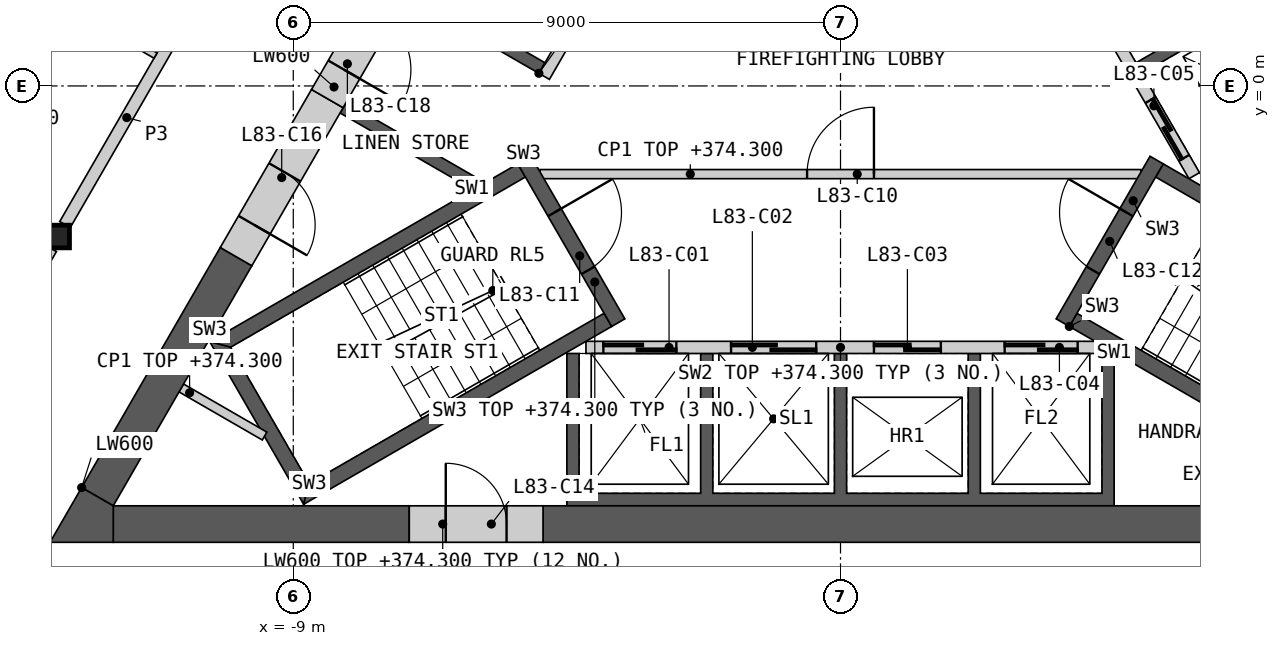
"""IFC4 building model, lengths in metres.
Left out: names, types, materials, properties, quantities, classifications, styles, units other than length and angle.
Written with IfcOpenShell. Run it as: python <this file> out.ifc"""

import sys

from ifc_helpers import new_model, si_unit, direction, frame, frame_2d, origin, origin_2d, place, context, subcontext, project, spatial, polyline, rectangle, i_section, outline, extrude, element, fill, save


model = new_model("IFC4")
c1 = context("Model", 3, precision=1e-05, world=origin(), true_north=direction((0.0, 1.0)))
c2 = subcontext(c1, "Body", "Model", "MODEL_VIEW")
j1 = project(units=[si_unit("LENGTHUNIT", "METRE"), si_unit("PLANEANGLEUNIT", "RADIAN")], contexts=[c1])
p1 = place(None, origin())
s1 = spatial("IfcSite", under=j1, at=p1, CompositionType="ELEMENT")
p2 = place(p1, origin())
s2 = spatial("IfcBuilding", under=s1, at=p2, CompositionType="ELEMENT")
p3 = place(p2, frame((0.0, 0.0, 371.2)))
s3 = spatial("IfcBuildingStorey", under=s2, at=p3, CompositionType="ELEMENT", Elevation=371.2)
p4 = place(p3, frame((-12.868, -2.476, 0.0), z_axis=(0.0, 0.0, 1.0), x_axis=(1.0, 0.0, 0.0)))
e1 = element("IfcColumn", 1, at=p4, inside=s3, PredefinedType="COLUMN", context=c2, shape_type="SweptSolid", body=[
    extrude(i_section(OverallWidth=0.374, OverallDepth=0.372, WebThickness=0.016, FlangeThickness=0.026, at=origin_2d()), origin(), (0.0, 0.0, 1.0), 3.4),
])
p5 = place(p3, origin())
e2 = element("IfcWall", 2, at=p5, inside=s3, PredefinedType="SHEAR", context=c2, shape_type="SweptSolid", body=[
    extrude(outline(polyline([(4.5, -4.4), (4.5, -6.906), (-4.5, -6.906), (-4.5, -4.4), (-4.3, -4.4), (-4.3, -6.7), (-2.3, -6.7), (-2.3, -4.4), (-2.1, -4.4), (-2.1, -6.7), (-0.1, -6.7), (-0.1, -4.4), (0.1, -4.4), (0.1, -6.7), (2.1, -6.7), (2.1, -4.4), (2.3, -4.4), (2.3, -6.7), (4.3, -6.7), (4.3, -4.4), (4.5, -4.4)])), origin(), (0.0, 0.0, 1.0), 3.1),
])
p6 = place(p3, frame((-4.187, -4.3, 0.0), z_axis=(0.0, 0.0, 1.0), x_axis=(1.0, 0.0, 0.0)))
e3 = element("IfcWall", 3, at=p6, inside=s3, PredefinedType="SOLIDWALL", context=c2, shape_type="SweptSolid", body=[
    extrude(rectangle(XDim=8.373, YDim=0.2, at=frame_2d((4.187, 0.0))), origin(), (0.0, 0.0, 1.0), 3.1),
])
p7 = place(p6, frame((0.287, 0.0, 0.0)))
e4 = element("IfcOpeningElement", 4, at=p7, cuts=e3, PredefinedType="OPENING", context=c2, shape_type="SweptSolid", body=[
    extrude(rectangle(XDim=1.2, YDim=2.1, at=frame_2d((0.6, 1.05))), frame((0.0, 0.11, 0.0), z_axis=(0.0, -1.0, 0.0), x_axis=(1.0, 0.0, 0.0)), (0.0, 0.0, 1.0), 0.22),
])
p8 = place(p6, frame((2.387, 0.0, 0.0)))
e5 = element("IfcOpeningElement", 5, at=p8, cuts=e3, PredefinedType="OPENING", context=c2, shape_type="SweptSolid", body=[
    extrude(rectangle(XDim=1.4, YDim=2.1, at=frame_2d((0.7, 1.05))), frame((0.0, 0.11, 0.0), z_axis=(0.0, -1.0, 0.0), x_axis=(1.0, 0.0, 0.0)), (0.0, 0.0, 1.0), 0.22),
])
p9 = place(p6, frame((4.737, 0.0, 0.0)))
e6 = element("IfcOpeningElement", 6, at=p9, cuts=e3, PredefinedType="OPENING", context=c2, shape_type="SweptSolid", body=[
    extrude(rectangle(XDim=1.1, YDim=2.1, at=frame_2d((0.55, 1.05))), frame((0.0, 0.11, 0.0), z_axis=(0.0, -1.0, 0.0), x_axis=(1.0, 0.0, 0.0)), (0.0, 0.0, 1.0), 0.22),
])
p10 = place(p6, frame((6.887, 0.0, 0.0)))
e7 = element("IfcOpeningElement", 7, at=p10, cuts=e3, PredefinedType="OPENING", context=c2, shape_type="SweptSolid", body=[
    extrude(rectangle(XDim=1.2, YDim=2.1, at=frame_2d((0.6, 1.05))), frame((0.0, 0.11, 0.0), z_axis=(0.0, -1.0, 0.0), x_axis=(1.0, 0.0, 0.0)), (0.0, 0.0, 1.0), 0.22),
])
p11 = place(p3, origin())
e8 = element("IfcWall", 8, at=p11, inside=s3, PredefinedType="SHEAR", context=c2, shape_type="SweptSolid", body=[
    extrude(outline(polyline([(1.561, 6.097), (3.731, 7.35), (8.231, -0.444), (6.061, -1.697), (5.96, -1.524), (7.952, -0.374), (6.952, 1.358), (4.96, 0.208), (4.861, 0.381), (6.852, 1.531), (5.852, 3.263), (3.861, 2.113), (3.76, 2.287), (5.752, 3.437), (4.752, 5.169), (2.76, 4.019), (2.66, 4.192), (4.652, 5.342), (3.652, 7.074), (1.66, 5.924), (1.561, 6.097)])), origin(), (0.0, 0.0, 1.0), 3.1),
])
p12 = place(p3, frame((5.817, -1.476, 0.0), z_axis=(0.0, 0.0, 1.0), x_axis=(-0.500002616675, 0.866023893041, 0.0)))
e9 = element("IfcWall", 9, at=p12, inside=s3, PredefinedType="SOLIDWALL", context=c2, shape_type="SweptSolid", body=[
    extrude(rectangle(XDim=8.373, YDim=0.2, at=frame_2d((4.187, 0.0))), origin(), (0.0, 0.0, 1.0), 3.1),
])
p13 = place(p12, frame((0.337, 0.0, 0.0)))
e10 = element("IfcOpeningElement", 10, at=p13, cuts=e9, PredefinedType="OPENING", context=c2, shape_type="SweptSolid", body=[
    extrude(rectangle(XDim=1.1, YDim=2.1, at=frame_2d((0.55, 1.05))), frame((0.0, 0.11, 0.0), z_axis=(0.0, -1.0, 0.0), x_axis=(1.0, 0.0, 0.0)), (0.0, 0.0, 1.0), 0.22),
])
p14 = place(p12, frame((2.537, 0.0, 0.0)))
e11 = element("IfcOpeningElement", 11, at=p14, cuts=e9, PredefinedType="OPENING", context=c2, shape_type="SweptSolid", body=[
    extrude(rectangle(XDim=1.1, YDim=2.1, at=frame_2d((0.55, 1.05))), frame((0.0, 0.11, 0.0), z_axis=(0.0, -1.0, 0.0), x_axis=(1.0, 0.0, 0.0)), (0.0, 0.0, 1.0), 0.22),
])
p15 = place(p12, frame((4.737, 0.0, 0.0)))
e12 = element("IfcOpeningElement", 12, at=p15, cuts=e9, PredefinedType="OPENING", context=c2, shape_type="SweptSolid", body=[
    extrude(rectangle(XDim=1.1, YDim=2.1, at=frame_2d((0.55, 1.05))), frame((0.0, 0.11, 0.0), z_axis=(0.0, -1.0, 0.0), x_axis=(1.0, 0.0, 0.0)), (0.0, 0.0, 1.0), 0.22),
])
p16 = place(p12, frame((7.037, 0.0, 0.0)))
e13 = element("IfcOpeningElement", 13, at=p16, cuts=e9, PredefinedType="OPENING", context=c2, shape_type="SweptSolid", body=[
    extrude(rectangle(XDim=0.9, YDim=2.1, at=frame_2d((0.45, 1.05))), frame((0.0, 0.11, 0.0), z_axis=(0.0, -1.0, 0.0), x_axis=(1.0, 0.0, 0.0)), (0.0, 0.0, 1.0), 0.22),
])
p17 = place(p3, origin())
e14 = element("IfcWall", 14, at=p17, inside=s3, PredefinedType="SHEAR", context=c2, shape_type="SweptSolid", body=[
    extrude(outline(polyline([(-6.061, -1.697), (-8.231, -0.444), (-8.131, -0.271), (-5.96, -1.524), (-6.061, -1.697)])), origin(), (0.0, 0.0, 1.0), 3.1),
])
p18 = place(p3, origin())
e15 = element("IfcWall", 15, at=p18, inside=s3, PredefinedType="SHEAR", context=c2, shape_type="SweptSolid", body=[
    extrude(outline(polyline([(-4.96, 0.208), (-7.131, 1.461), (-3.731, 7.35), (-1.561, 6.097), (-1.66, 5.924), (-3.652, 7.074), (-6.852, 1.531), (-4.861, 0.381), (-4.96, 0.208)])), origin(), (0.0, 0.0, 1.0), 3.1),
])
p19 = place(p3, frame((-1.631, 5.776, 0.0), z_axis=(0.0, 0.0, 1.0), x_axis=(-0.499992876559, -0.866029516466, 0.0)))
e16 = element("IfcWall", 16, at=p19, inside=s3, PredefinedType="SOLIDWALL", context=c2, shape_type="SweptSolid", body=[
    extrude(rectangle(XDim=6.486, YDim=0.2, at=frame_2d((3.243, 0.0))), origin(), (0.0, 0.0, 1.0), 3.1),
])
p20 = place(p19, frame((2.637, 0.0, 0.0)))
e17 = element("IfcOpeningElement", 17, at=p20, cuts=e16, PredefinedType="OPENING", context=c2, shape_type="SweptSolid", body=[
    extrude(rectangle(XDim=0.9, YDim=2.1, at=frame_2d((0.45, 1.05))), frame((0.0, 0.11, 0.0), z_axis=(0.0, -1.0, 0.0), x_axis=(1.0, 0.0, 0.0)), (0.0, 0.0, 1.0), 0.22),
])
p21 = place(p3, frame((-4.941, -1.45, 0.0), z_axis=(0.0, 0.0, 1.0), x_axis=(1.0, 0.0, 0.0)))
e18 = element("IfcWall", 18, at=p21, inside=s3, PredefinedType="PARTITIONING", context=c2, shape_type="SweptSolid", body=[
    extrude(rectangle(XDim=9.882, YDim=0.15, at=frame_2d((4.941, 0.0))), origin(), (0.0, 0.0, 1.0), 3.1),
])
p22 = place(p21, frame((4.391, 0.0, 0.0)))
e19 = element("IfcOpeningElement", 19, at=p22, cuts=e18, PredefinedType="OPENING", context=c2, shape_type="SweptSolid", body=[
    extrude(rectangle(XDim=1.1, YDim=2.1, at=frame_2d((0.55, 1.05))), frame((0.0, 0.085, 0.0), z_axis=(0.0, -1.0, 0.0), x_axis=(1.0, 0.0, 0.0)), (0.0, 0.0, 1.0), 0.17),
])
p23 = place(p3, origin())
e20 = element("IfcWall", 20, at=p23, inside=s3, PredefinedType="SHEAR", context=c2, shape_type="SweptSolid", body=[
    extrude(outline(polyline([(-5.307, -1.281), (-10.374, -4.206), (-10.032, -4.298), (-5.182, -1.498), (-5.307, -1.281)])), origin(), (0.0, 0.0, 1.0), 3.1),
])
p24 = place(p3, origin())
e21 = element("IfcWall", 21, at=p24, inside=s3, PredefinedType="SHEAR", context=c2, shape_type="SweptSolid", body=[
    extrude(outline(polyline([(-10.374, -4.206), (-8.83, -6.881), (-8.738, -6.539), (-10.032, -4.298), (-10.374, -4.206)])), origin(), (0.0, 0.0, 1.0), 3.1),
])
p25 = place(p3, origin())
e22 = element("IfcWall", 22, at=p25, inside=s3, PredefinedType="SHEAR", context=c2, shape_type="SweptSolid", body=[
    extrude(outline(polyline([(-8.738, -6.539), (-8.83, -6.881), (-3.763, -3.956), (-3.888, -3.739), (-8.738, -6.539)])), origin(), (0.0, 0.0, 1.0), 3.1),
])
p26 = place(p3, frame((-5.199, -1.219, 0.0), z_axis=(0.0, 0.0, 1.0), x_axis=(0.499982516597, -0.866035497597, 0.0)))
e23 = element("IfcWall", 23, at=p26, inside=s3, PredefinedType="SHEAR", context=c2, shape_type="SweptSolid", body=[
    extrude(rectangle(XDim=3.088, YDim=0.25, at=frame_2d((1.544, 0.0))), origin(), (0.0, 0.0, 1.0), 3.1),
])
p27 = place(p26, frame((0.994, 0.0, 0.0)))
e24 = element("IfcOpeningElement", 24, at=p27, cuts=e23, PredefinedType="OPENING", context=c2, shape_type="SweptSolid", body=[
    extrude(rectangle(XDim=1.1, YDim=2.1, at=frame_2d((0.55, 1.05))), frame((0.0, 0.135, 0.0), z_axis=(0.0, -1.0, 0.0), x_axis=(1.0, 0.0, 0.0)), (0.0, 0.0, 1.0), 0.27),
])
p28 = place(p3, origin())
e25 = element("IfcWall", 25, at=p28, inside=s3, PredefinedType="SHEAR", context=c2, shape_type="SweptSolid", body=[
    extrude(outline(polyline([(3.763, -3.956), (8.83, -6.881), (8.738, -6.539), (3.888, -3.739), (3.763, -3.956)])), origin(), (0.0, 0.0, 1.0), 3.1),
])
p29 = place(p3, origin())
e26 = element("IfcWall", 26, at=p29, inside=s3, PredefinedType="SHEAR", context=c2, shape_type="SweptSolid", body=[
    extrude(outline(polyline([(10.032, -4.298), (10.374, -4.206), (5.307, -1.281), (5.182, -1.498), (10.032, -4.298)])), origin(), (0.0, 0.0, 1.0), 3.1),
])
p30 = place(p3, frame((3.655, -3.893, 0.0), z_axis=(0.0, 0.0, 1.0), x_axis=(0.499982516597, 0.866035497597, 0.0)))
e27 = element("IfcWall", 27, at=p30, inside=s3, PredefinedType="SHEAR", context=c2, shape_type="SweptSolid", body=[
    extrude(rectangle(XDim=3.088, YDim=0.25, at=frame_2d((1.544, 0.0))), origin(), (0.0, 0.0, 1.0), 3.1),
])
p31 = place(p30, frame((0.994, 0.0, 0.0)))
e28 = element("IfcOpeningElement", 28, at=p31, cuts=e27, PredefinedType="OPENING", context=c2, shape_type="SweptSolid", body=[
    extrude(rectangle(XDim=1.1, YDim=2.1, at=frame_2d((0.55, 1.05))), frame((0.0, 0.135, 0.0), z_axis=(0.0, -1.0, 0.0), x_axis=(1.0, 0.0, 0.0)), (0.0, 0.0, 1.0), 0.27),
])
p32 = place(p3, frame((-10.842, -4.967, 0.0), z_axis=(0.0, 0.0, 1.0), x_axis=(0.866098216386, -0.499873863663, 0.0)))
e29 = element("IfcWall", 29, at=p32, inside=s3, PredefinedType="PARTITIONING", context=c2, shape_type="SweptSolid", body=[
    extrude(rectangle(XDim=1.582, YDim=0.15, at=frame_2d((0.791, 0.0))), origin(), (0.0, 0.0, 1.0), 3.1),
])
p33 = place(p3, frame((-4.892, -7.206, 0.0), z_axis=(0.0, 0.0, 1.0), x_axis=(1.0, 0.0, 0.0)))
e30 = element("IfcWall", 30, at=p33, inside=s3, PredefinedType="SHEAR", context=c2, shape_type="SweptSolid", body=[
    extrude(rectangle(XDim=16.853, YDim=0.6, at=frame_2d((8.426, 0.0))), origin(), (0.0, 0.0, 1.0), 3.1),
])
p34 = place(p3, frame((-11.961, -7.206, 0.0), z_axis=(0.0, 0.0, 1.0), x_axis=(1.0, 0.0, 0.0)))
e31 = element("IfcWall", 31, at=p34, inside=s3, PredefinedType="SHEAR", context=c2, shape_type="SweptSolid", body=[
    extrude(rectangle(XDim=4.868, YDim=0.6, at=frame_2d((2.434, 0.0))), origin(), (0.0, 0.0, 1.0), 3.1),
])
p35 = place(p3, frame((8.686, -0.634, 0.0), z_axis=(0.0, 0.0, 1.0), x_axis=(-0.500004601921, 0.866022746848, 0.0)))
e32 = element("IfcWall", 32, at=p35, inside=s3, PredefinedType="SHEAR", context=c2, shape_type="SweptSolid", body=[
    extrude(rectangle(XDim=16.853, YDim=0.6, at=frame_2d((8.426, 0.0))), origin(), (0.0, 0.0, 1.0), 3.1),
])
p36 = place(p3, frame((-9.941, -2.807, 0.0), z_axis=(0.0, 0.0, 1.0), x_axis=(-0.500020646047, -0.866013483456, 0.0)))
e33 = element("IfcWall", 33, at=p36, inside=s3, PredefinedType="SHEAR", context=c2, shape_type="SweptSolid", body=[
    extrude(rectangle(XDim=4.559, YDim=0.6, at=frame_2d((2.28, 0.0))), origin(), (0.0, 0.0, 1.0), 3.1),
])
p37 = place(p3, origin())
e34 = element("IfcWall", 34, at=p37, inside=s3, PredefinedType="SHEAR", context=c2, shape_type="SweptSolid", body=[
    extrude(outline(polyline([(-12.48, -6.606), (-11.961, -6.906), (-11.961, -7.506), (-13.0, -7.506), (-12.48, -6.606)])), origin(), (0.0, 0.0, 1.0), 3.1),
])
p38 = place(p3, frame((-7.092, -7.206, 0.0), z_axis=(0.0, 0.0, 1.0), x_axis=(1.0, 0.0, 0.0)))
e35 = element("IfcWall", 35, at=p38, inside=s3, PredefinedType="SHEAR", context=c2, shape_type="SweptSolid", body=[
    extrude(rectangle(XDim=2.2, YDim=0.6, at=frame_2d((1.1, 0.0))), origin(), (0.0, 0.0, 1.0), 3.1),
])
p39 = place(p38, frame((0.6, 0.0, 0.0)))
e36 = element("IfcOpeningElement", 36, at=p39, cuts=e35, PredefinedType="OPENING", context=c2, shape_type="SweptSolid", body=[
    extrude(rectangle(XDim=1.0, YDim=2.1, at=frame_2d((0.5, 1.05))), frame((0.0, 0.31, 0.0), z_axis=(0.0, -1.0, 0.0), x_axis=(1.0, 0.0, 0.0)), (0.0, 0.0, 1.0), 0.62),
])
p40 = place(p3, frame((-8.44, -0.208, 0.0), z_axis=(0.0, 0.0, 1.0), x_axis=(-0.499997052475, -0.866027105532, 0.0)))
e37 = element("IfcWall", 37, at=p40, inside=s3, PredefinedType="SHEAR", context=c2, shape_type="SweptSolid", body=[
    extrude(rectangle(XDim=3.001, YDim=0.6, at=frame_2d((1.501, 0.0))), origin(), (0.0, 0.0, 1.0), 3.1),
])
p41 = place(p40, frame((1.4, 0.0, 0.0)))
e38 = element("IfcOpeningElement", 38, at=p41, cuts=e37, PredefinedType="OPENING", context=c2, shape_type="SweptSolid", body=[
    extrude(rectangle(XDim=1.0, YDim=2.1, at=frame_2d((0.5, 1.05))), frame((0.0, 0.31, 0.0), z_axis=(0.0, -1.0, 0.0), x_axis=(1.0, 0.0, 0.0)), (0.0, 0.0, 1.0), 0.62),
])
p42 = place(p3, frame((-7.34, 1.698, 0.0), z_axis=(0.0, 0.0, 1.0), x_axis=(-0.50002983664, -0.866008176907, 0.0)))
e39 = element("IfcWall", 39, at=p42, inside=s3, PredefinedType="SHEAR", context=c2, shape_type="SweptSolid", body=[
    extrude(rectangle(XDim=2.2, YDim=0.6, at=frame_2d((1.1, 0.0))), origin(), (0.0, 0.0, 1.0), 3.1),
])
p43 = place(p42, frame((0.55, 0.0, 0.0)))
e40 = element("IfcOpeningElement", 40, at=p43, cuts=e39, PredefinedType="OPENING", context=c2, shape_type="SweptSolid", body=[
    extrude(rectangle(XDim=1.1, YDim=2.1, at=frame_2d((0.55, 1.05))), frame((0.0, 0.31, 0.0), z_axis=(0.0, -1.0, 0.0), x_axis=(1.0, 0.0, 0.0)), (0.0, 0.0, 1.0), 0.62),
])
p44 = place(p3, frame((-12.754, -2.279, 0.0), z_axis=(0.0, 0.0, 1.0), x_axis=(0.500001682468, 0.866024432409, 0.0)))
e41 = element("IfcWall", 41, at=p44, inside=s3, PredefinedType="PARTITIONING", context=c2, shape_type="SweptSolid", body=[
    extrude(rectangle(XDim=8.124, YDim=0.2, at=frame_2d((4.062, 0.0))), origin(), (0.0, 0.0, 1.0), 3.1),
])
p45 = place(p44, frame((3.762, 0.0, 0.0)))
e42 = element("IfcOpeningElement", 42, at=p45, cuts=e41, PredefinedType="OPENING", context=c2, shape_type="SweptSolid", body=[
    extrude(rectangle(XDim=1.0, YDim=2.1, at=frame_2d((0.5, 1.05))), frame((0.0, 0.11, 0.0), z_axis=(0.0, -1.0, 0.0), x_axis=(1.0, 0.0, 0.0)), (0.0, 0.0, 1.0), 0.22),
])
p46 = place(p3, frame((-15.131, -6.397, 0.0), z_axis=(0.0, 0.0, 1.0), x_axis=(0.499986217557, 0.866033360935, 0.0)))
e43 = element("IfcWall", 43, at=p46, inside=s3, PredefinedType="PARTITIONING", context=c2, shape_type="SweptSolid", body=[
    extrude(rectangle(XDim=4.3, YDim=0.2, at=frame_2d((2.15, 0.0))), origin(), (0.0, 0.0, 1.0), 3.1),
])
p47 = place(p3, frame((-17.414, 4.049, 0.0), z_axis=(0.0, 0.0, 1.0), x_axis=(0.866033839264, -0.499985389037, 0.0)))
e44 = element("IfcWall", 44, at=p47, inside=s3, PredefinedType="PARTITIONING", context=c2, shape_type="SweptSolid", body=[
    extrude(rectangle(XDim=7.1, YDim=0.1, at=frame_2d((3.55, 0.0))), origin(), (0.0, 0.0, 1.0), 2.33),
])
p48 = place(p47, frame((1.158, 0.0, 0.0)))
e45 = element("IfcOpeningElement", 45, at=p48, cuts=e44, PredefinedType="OPENING", context=c2, shape_type="SweptSolid", body=[
    extrude(rectangle(XDim=0.95, YDim=2.1, at=frame_2d((0.475, 1.05))), frame((0.0, 0.06, 0.0), z_axis=(0.0, -1.0, 0.0), x_axis=(1.0, 0.0, 0.0)), (0.0, 0.0, 1.0), 0.12),
])
p49 = place(p7, origin())
e46 = element("IfcDoor", 46, at=p49, inside=s3, OperationType="SLIDING_TO_LEFT", PredefinedType="DOOR", context=c2, shape_type="SweptSolid", body=[
    extrude(rectangle(XDim=1.2, YDim=2.1, at=frame_2d((0.6, 1.05))), frame((0.0, 0.025, 0.0), z_axis=(0.0, -1.0, 0.0), x_axis=(1.0, 0.0, 0.0)), (0.0, 0.0, 1.0), 0.05),
])
fill(e4, e46)
p50 = place(p8, origin())
e47 = element("IfcDoor", 47, at=p50, inside=s3, OperationType="SLIDING_TO_LEFT", PredefinedType="DOOR", context=c2, shape_type="SweptSolid", body=[
    extrude(rectangle(XDim=1.4, YDim=2.1, at=frame_2d((0.7, 1.05))), frame((0.0, 0.025, 0.0), z_axis=(0.0, -1.0, 0.0), x_axis=(1.0, 0.0, 0.0)), (0.0, 0.0, 1.0), 0.05),
])
fill(e5, e47)
p51 = place(p9, origin())
e48 = element("IfcDoor", 48, at=p51, inside=s3, OperationType="SLIDING_TO_LEFT", PredefinedType="DOOR", context=c2, shape_type="SweptSolid", body=[
    extrude(rectangle(XDim=1.1, YDim=2.1, at=frame_2d((0.55, 1.05))), frame((0.0, 0.025, 0.0), z_axis=(0.0, -1.0, 0.0), x_axis=(1.0, 0.0, 0.0)), (0.0, 0.0, 1.0), 0.05),
])
fill(e6, e48)
p52 = place(p10, origin())
e49 = element("IfcDoor", 49, at=p52, inside=s3, OperationType="SLIDING_TO_LEFT", PredefinedType="DOOR", context=c2, shape_type="SweptSolid", body=[
    extrude(rectangle(XDim=1.2, YDim=2.1, at=frame_2d((0.6, 1.05))), frame((0.0, 0.025, 0.0), z_axis=(0.0, -1.0, 0.0), x_axis=(1.0, 0.0, 0.0)), (0.0, 0.0, 1.0), 0.05),
])
fill(e7, e49)
p53 = place(p13, origin())
e50 = element("IfcDoor", 50, at=p53, inside=s3, OperationType="SLIDING_TO_LEFT", PredefinedType="DOOR", context=c2, shape_type="SweptSolid", body=[
    extrude(rectangle(XDim=1.1, YDim=2.1, at=frame_2d((0.55, 1.05))), frame((0.0, 0.025, 0.0), z_axis=(0.0, -1.0, 0.0), x_axis=(1.0, 0.0, 0.0)), (0.0, 0.0, 1.0), 0.05),
])
fill(e10, e50)
p54 = place(p22, origin())
e51 = element("IfcDoor", 51, at=p54, inside=s3, OperationType="SINGLE_SWING_RIGHT", PredefinedType="DOOR", context=c2, shape_type="SweptSolid", body=[
    extrude(rectangle(XDim=1.1, YDim=2.1, at=frame_2d((0.55, 1.05))), frame((0.0, 0.025, 0.0), z_axis=(0.0, -1.0, 0.0), x_axis=(1.0, 0.0, 0.0)), (0.0, 0.0, 1.0), 0.05),
])
fill(e19, e51)
p55 = place(p27, origin())
e52 = element("IfcDoor", 52, at=p55, inside=s3, OperationType="SINGLE_SWING_LEFT", PredefinedType="DOOR", context=c2, shape_type="SweptSolid", body=[
    extrude(rectangle(XDim=1.1, YDim=2.1, at=frame_2d((0.55, 1.05))), frame((0.0, 0.025, 0.0), z_axis=(0.0, -1.0, 0.0), x_axis=(1.0, 0.0, 0.0)), (0.0, 0.0, 1.0), 0.05),
])
fill(e24, e52)
p56 = place(p31, origin())
e53 = element("IfcDoor", 53, at=p56, inside=s3, OperationType="SINGLE_SWING_RIGHT", PredefinedType="DOOR", context=c2, shape_type="SweptSolid", body=[
    extrude(rectangle(XDim=1.1, YDim=2.1, at=frame_2d((0.55, 1.05))), frame((0.0, 0.025, 0.0), z_axis=(0.0, -1.0, 0.0), x_axis=(1.0, 0.0, 0.0)), (0.0, 0.0, 1.0), 0.05),
])
fill(e28, e53)
p57 = place(p39, origin())
e54 = element("IfcDoor", 54, at=p57, inside=s3, OperationType="SINGLE_SWING_LEFT", PredefinedType="DOOR", context=c2, shape_type="SweptSolid", body=[
    extrude(rectangle(XDim=1.0, YDim=2.1, at=frame_2d((0.5, 1.05))), frame((0.0, 0.055, 0.0), z_axis=(0.0, -1.0, 0.0), x_axis=(1.0, 0.0, 0.0)), (0.0, 0.0, 1.0), 0.05),
])
fill(e36, e54)
p58 = place(p41, origin())
e55 = element("IfcDoor", 55, at=p58, inside=s3, OperationType="SINGLE_SWING_RIGHT", PredefinedType="DOOR", context=c2, shape_type="SweptSolid", body=[
    extrude(rectangle(XDim=1.0, YDim=2.1, at=frame_2d((0.5, 1.05))), frame((0.0, 0.055, 0.0), z_axis=(0.0, -1.0, 0.0), x_axis=(1.0, 0.0, 0.0)), (0.0, 0.0, 1.0), 0.05),
])
fill(e38, e55)
p59 = place(p43, origin())
e56 = element("IfcDoor", 56, at=p59, inside=s3, OperationType="SINGLE_SWING_RIGHT", PredefinedType="DOOR", context=c2, shape_type="SweptSolid", body=[
    extrude(rectangle(XDim=1.1, YDim=2.1, at=frame_2d((0.55, 1.05))), frame((0.0, 0.055, 0.0), z_axis=(0.0, -1.0, 0.0), x_axis=(1.0, 0.0, 0.0)), (0.0, 0.0, 1.0), 0.05),
])
fill(e40, e56)
save(model, sys.argv[1])
